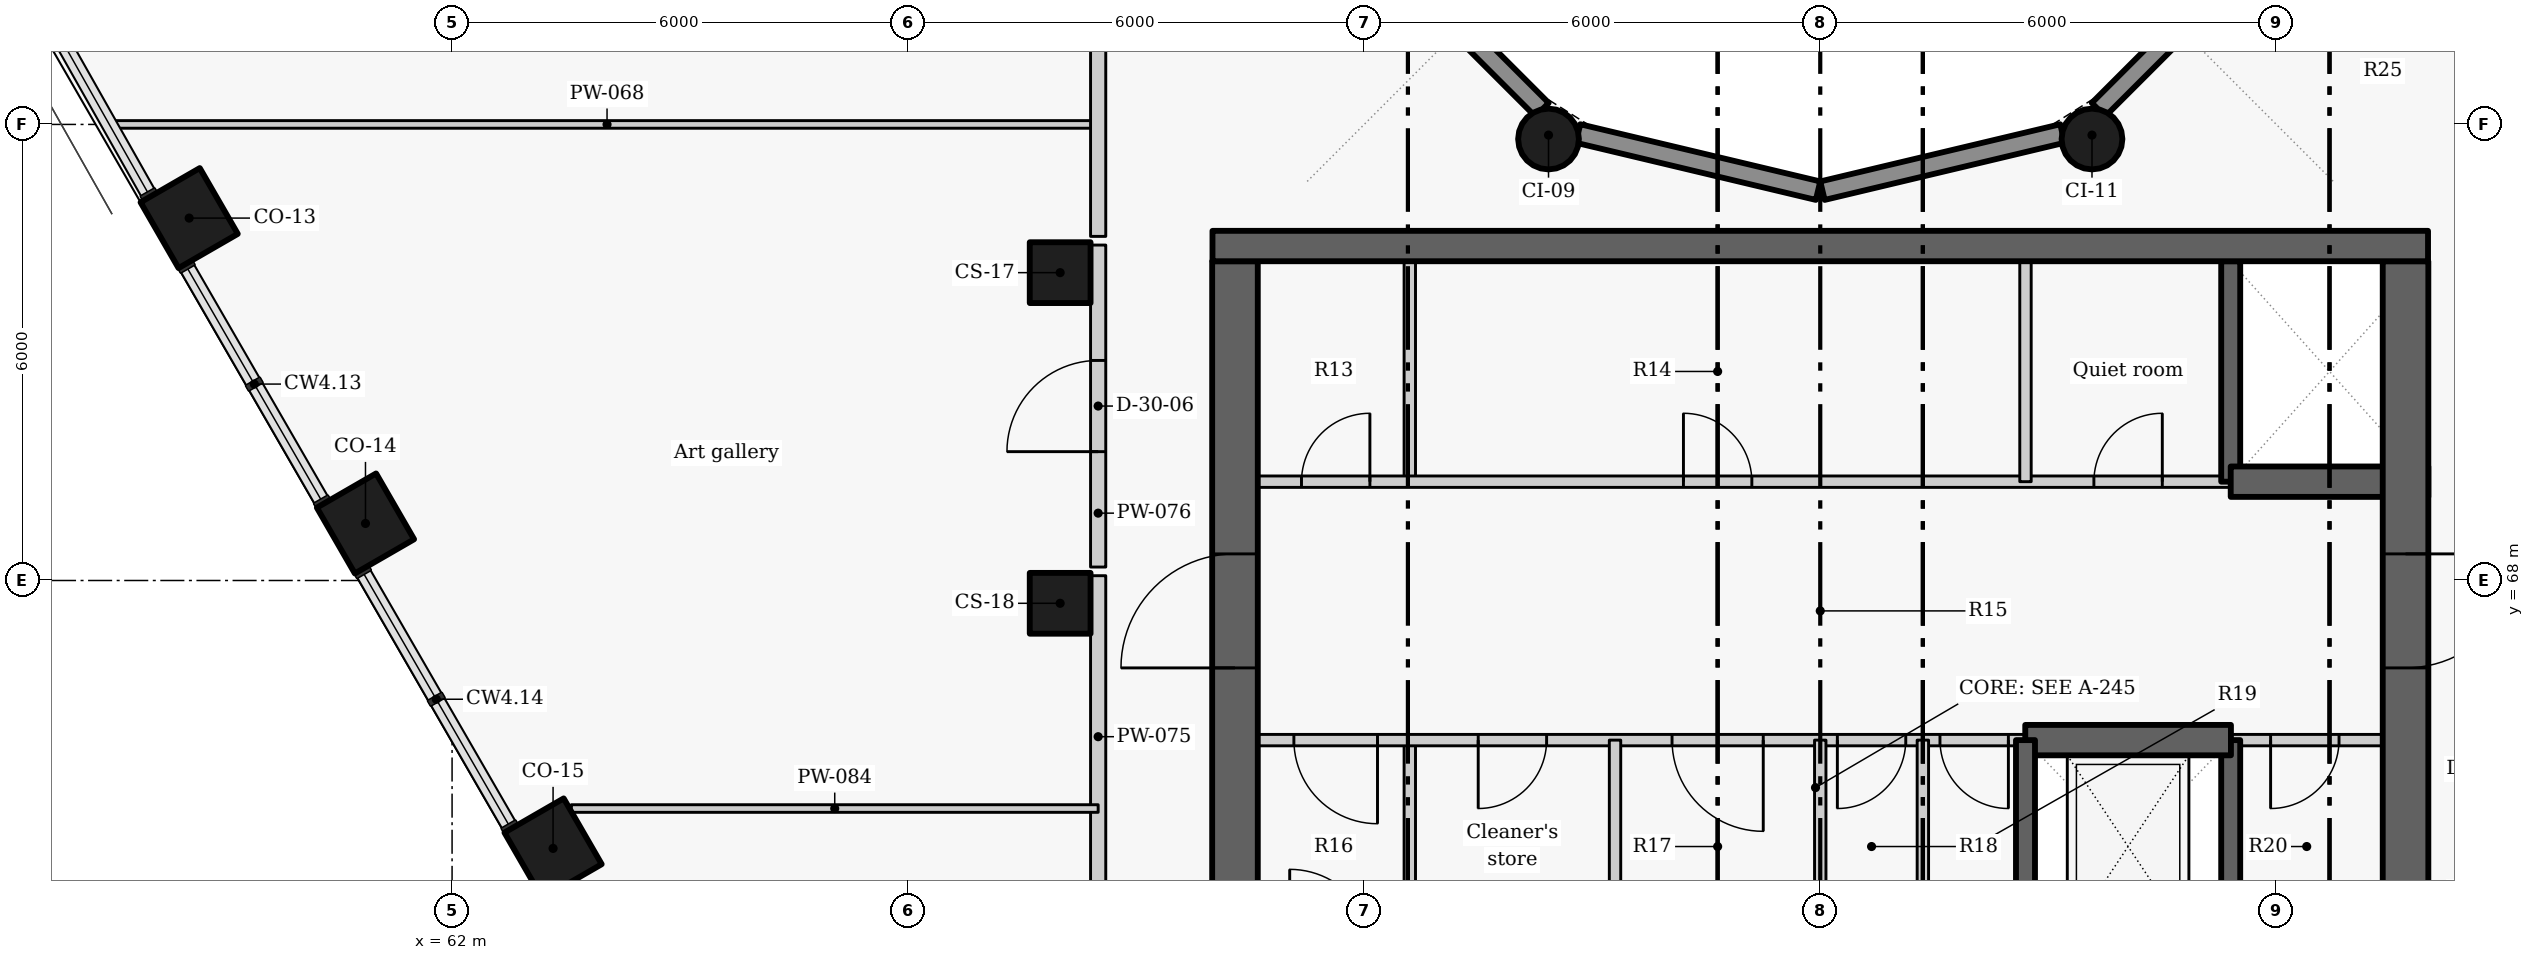
"""IFC4 building model, lengths in metres.
Left out: names, types, materials, properties, quantities, classifications, styles, units other than length and angle.
Written with IfcOpenShell. Run it as: python <this file> out.ifc"""

import sys

from ifc_helpers import new_model, si_unit, direction, frame, frame_2d, origin, origin_2d, place, context, subcontext, project, spatial, rectangle, circle, extrude, element, fill, save


model = new_model("IFC4")
c1 = context("Model", 3, precision=1e-05, world=origin(), true_north=direction((0.0, 1.0)))
c2 = subcontext(c1, "Body", "Model", "MODEL_VIEW")
j1 = project(units=[si_unit("LENGTHUNIT", "METRE"), si_unit("PLANEANGLEUNIT", "RADIAN")], contexts=[c1])
p1 = place(None, origin())
s1 = spatial("IfcSite", under=j1, at=p1, CompositionType="ELEMENT")
p2 = place(p1, origin())
s2 = spatial("IfcBuilding", under=s1, at=p2, CompositionType="ELEMENT")
p3 = place(p2, frame((0.0, 0.0, 272.4)))
s3 = spatial("IfcBuildingStorey", under=s2, at=p3, CompositionType="ELEMENT", Elevation=272.4)
for number, where, z_axis, x_axis in (
    (1, (58.541, 72.768, 0.0), (0.0, 0.0, 1.0), (0.5, -0.866, 0.0)),
    (2, (60.861, 68.75, 0.0), (0.0, 0.0, 1.0), (0.5, -0.866, 0.0)),
    (3, (63.329, 64.475, 0.0), (0.0, 0.0, 1.0), (0.5, -0.866, 0.0)),
):
    element("IfcColumn", number, at=place(p3, frame(where, z_axis=z_axis, x_axis=x_axis)), inside=s3, PredefinedType="COLUMN", context=c2, shape_type="SweptSolid", body=[
        extrude(rectangle(XDim=1.0, YDim=0.9, at=origin_2d()), origin(), (0.0, 0.0, 1.0), 3.6),
    ])
for number, where, z_axis, x_axis in (
    (4, (70.0, 72.05, 0.0), (0.0, 0.0, 1.0), (0.0, -1.0, 0.0)),
    (5, (70.0, 67.7, 0.0), (0.0, 0.0, 1.0), (0.0, -1.0, 0.0)),
):
    element("IfcColumn", number, at=place(p3, frame(where, z_axis=z_axis, x_axis=x_axis)), inside=s3, PredefinedType="COLUMN", context=c2, shape_type="SweptSolid", body=[
        extrude(rectangle(XDim=0.8, YDim=0.8, at=origin_2d()), origin(), (0.0, 0.0, 1.0), 3.6),
    ])
for number, where, z_axis, x_axis in (
    (6, (76.425, 73.808, 0.0), (0.0, 0.0, 1.0), (0.866, -0.5, 0.0)),
    (7, (83.575, 73.808, 0.0), (0.0, 0.0, 1.0), (0.866, 0.5, 0.0)),
):
    element("IfcColumn", number, at=place(p3, frame(where, z_axis=z_axis, x_axis=x_axis)), inside=s3, PredefinedType="COLUMN", context=c2, shape_type="SweptSolid", body=[
        extrude(circle(Radius=0.4, at=origin_2d()), origin(), (0.0, 0.0, 1.0), 3.6),
    ])
p4 = place(p3, frame((85.806, 76.339, 0.0), z_axis=(0.0, 0.0, 1.0), x_axis=(-0.707106781187, -0.707106781187, 0.0)))
e8 = element("IfcWall", 8, at=p4, inside=s3, PredefinedType="SOLIDWALL", context=c2, shape_type="SweptSolid", body=[
    extrude(rectangle(XDim=3.033, YDim=0.25, at=frame_2d((1.517, 0.0))), origin(), (0.0, 0.0, 1.0), 2.725),
])
for number, where, z_axis, x_axis in (
    (9, (83.186, 73.881, 0.0), (0.0, 0.0, 1.0), (-0.973, -0.232, 0.0)),
    (10, (79.971, 73.128, 0.0), (0.0, 0.0, 1.0), (-0.973, 0.232, 0.0)),
):
    element("IfcWall", number, at=place(p3, frame(where, z_axis=z_axis, x_axis=x_axis)), inside=s3, PredefinedType="SOLIDWALL", context=c2, shape_type="SweptSolid", body=[
        extrude(rectangle(XDim=3.246, YDim=0.25, at=frame_2d((1.623, 0.0))), origin(), (0.0, 0.0, 1.0), 2.725),
    ])
p5 = place(p3, frame((76.339, 74.194, 0.0), z_axis=(0.0, 0.0, 1.0), x_axis=(-0.707106781187, 0.707106781187, 0.0)))
e11 = element("IfcWall", 11, at=p5, inside=s3, PredefinedType="SOLIDWALL", context=c2, shape_type="SweptSolid", body=[
    extrude(rectangle(XDim=3.033, YDim=0.25, at=frame_2d((1.517, 0.0))), origin(), (0.0, 0.0, 1.0), 2.725),
])
p6 = place(p3, frame((74.6, 63.1, 0.0), z_axis=(0.0, 0.0, 1.0), x_axis=(0.0, 1.0, 0.0)))
e12 = element("IfcWall", 12, at=p6, inside=s3, PredefinedType="PARTITIONING", context=c2, shape_type="SweptSolid", body=[
    extrude(rectangle(XDim=2.8, YDim=0.15, at=frame_2d((1.4, 0.0))), origin(), (0.0, 0.0, 1.0), 3.325),
])
p7 = place(p3, frame((74.6, 69.3, 0.0), z_axis=(0.0, 0.0, 1.0), x_axis=(0.0, 1.0, 0.0)))
e13 = element("IfcWall", 13, at=p7, inside=s3, PredefinedType="PARTITIONING", context=c2, shape_type="SweptSolid", body=[
    extrude(rectangle(XDim=2.9, YDim=0.15, at=frame_2d((1.45, 0.0))), origin(), (0.0, 0.0, 1.0), 3.325),
])
p8 = place(p3, frame((72.0, 69.3, 0.0), z_axis=(0.0, 0.0, 1.0), x_axis=(1.0, 0.0, 0.0)))
e14 = element("IfcWall", 14, at=p8, inside=s3, PredefinedType="PARTITIONING", context=c2, shape_type="SweptSolid", body=[
    extrude(rectangle(XDim=13.4, YDim=0.15, at=frame_2d((6.7, 0.0))), origin(), (0.0, 0.0, 1.0), 3.325),
])
p9 = place(p8, frame((1.175, 0.0, 0.0)))
e15 = element("IfcOpeningElement", 15, at=p9, cuts=e14, PredefinedType="OPENING", context=c2, shape_type="SweptSolid", body=[
    extrude(rectangle(XDim=0.9, YDim=2.1, at=frame_2d((0.45, 1.05))), frame((0.0, 0.085, 0.0), z_axis=(0.0, -1.0, 0.0), x_axis=(1.0, 0.0, 0.0)), (0.0, 0.0, 1.0), 0.17),
])
p10 = place(p8, frame((6.2, 0.0, 0.0)))
e16 = element("IfcOpeningElement", 16, at=p10, cuts=e14, PredefinedType="OPENING", context=c2, shape_type="SweptSolid", body=[
    extrude(rectangle(XDim=0.9, YDim=2.1, at=frame_2d((0.45, 1.05))), frame((0.0, 0.085, 0.0), z_axis=(0.0, -1.0, 0.0), x_axis=(1.0, 0.0, 0.0)), (0.0, 0.0, 1.0), 0.17),
])
p11 = place(p8, frame((11.6, 0.0, 0.0)))
e17 = element("IfcOpeningElement", 17, at=p11, cuts=e14, PredefinedType="OPENING", context=c2, shape_type="SweptSolid", body=[
    extrude(rectangle(XDim=0.9, YDim=2.1, at=frame_2d((0.45, 1.05))), frame((0.0, 0.085, 0.0), z_axis=(0.0, -1.0, 0.0), x_axis=(1.0, 0.0, 0.0)), (0.0, 0.0, 1.0), 0.17),
])
p12 = place(p3, frame((72.3, 63.1, -0.275), z_axis=(0.0, 0.0, 1.0), x_axis=(0.0, 1.0, 0.0)))
e18 = element("IfcWall", 18, at=p12, inside=s3, PredefinedType="SHEAR", context=c2, shape_type="SweptSolid", body=[
    extrude(rectangle(XDim=9.1, YDim=0.6, at=frame_2d((4.55, 0.0))), origin(), (0.0, 0.0, 1.0), 3.6),
])
p13 = place(p12, frame((3.75, 0.0, 0.275)))
e19 = element("IfcOpeningElement", 19, at=p13, cuts=e18, PredefinedType="OPENING", context=c2, shape_type="SweptSolid", body=[
    extrude(rectangle(XDim=1.5, YDim=2.1, at=frame_2d((0.75, 1.05))), frame((0.0, 0.31, 0.0), z_axis=(0.0, -1.0, 0.0), x_axis=(1.0, 0.0, 0.0)), (0.0, 0.0, 1.0), 0.62),
])
p14 = place(p3, frame((85.4, 63.1, -0.275), z_axis=(0.0, 0.0, 1.0), x_axis=(0.0, 1.0, 0.0)))
e20 = element("IfcWall", 20, at=p14, inside=s3, PredefinedType="SHEAR", context=c2, shape_type="SweptSolid", body=[
    extrude(rectangle(XDim=2.8, YDim=0.25, at=frame_2d((1.4, 0.0))), origin(), (0.0, 0.0, 1.0), 3.6),
])
p15 = place(p3, frame((85.4, 69.3, -0.275), z_axis=(0.0, 0.0, 1.0), x_axis=(0.0, 1.0, 0.0)))
e21 = element("IfcWall", 21, at=p15, inside=s3, PredefinedType="SHEAR", context=c2, shape_type="SweptSolid", body=[
    extrude(rectangle(XDim=2.9, YDim=0.25, at=frame_2d((1.45, 0.0))), origin(), (0.0, 0.0, 1.0), 3.6),
])
p16 = place(p3, frame((85.4, 69.3, -0.275), z_axis=(0.0, 0.0, 1.0), x_axis=(1.0, 0.0, 0.0)))
e22 = element("IfcWall", 22, at=p16, inside=s3, PredefinedType="SHEAR", context=c2, shape_type="SweptSolid", body=[
    extrude(rectangle(XDim=2.6, YDim=0.4, at=frame_2d((1.3, 0.0))), origin(), (0.0, 0.0, 1.0), 3.6),
])
p17 = place(p3, frame((87.7, 72.2, -0.275), z_axis=(0.0, 0.0, 1.0), x_axis=(0.0, -1.0, 0.0)))
e23 = element("IfcWall", 23, at=p17, inside=s3, PredefinedType="SHEAR", context=c2, shape_type="SweptSolid", body=[
    extrude(rectangle(XDim=14.25, YDim=0.6, at=frame_2d((7.125, 0.0))), origin(), (0.0, 0.0, 1.0), 3.6),
])
p18 = place(p17, frame((3.85, 0.0, 0.275)))
e24 = element("IfcOpeningElement", 24, at=p18, cuts=e23, PredefinedType="OPENING", context=c2, shape_type="SweptSolid", body=[
    extrude(rectangle(XDim=1.5, YDim=2.1, at=frame_2d((0.75, 1.05))), frame((0.0, 0.31, 0.0), z_axis=(0.0, -1.0, 0.0), x_axis=(1.0, 0.0, 0.0)), (0.0, 0.0, 1.0), 0.62),
])
p19 = place(p17, frame((11.125, 0.0, 0.275)))
e25 = element("IfcOpeningElement", 25, at=p19, cuts=e23, PredefinedType="OPENING", context=c2, shape_type="SweptSolid", body=[
    extrude(rectangle(XDim=1.1, YDim=2.1, at=frame_2d((0.55, 1.05))), frame((0.0, 0.31, 0.0), z_axis=(0.0, -1.0, 0.0), x_axis=(1.0, 0.0, 0.0)), (0.0, 0.0, 1.0), 0.62),
])
p20 = place(p3, frame((82.7, 69.3, 0.0), z_axis=(0.0, 0.0, 1.0), x_axis=(0.0, 1.0, 0.0)))
e26 = element("IfcWall", 26, at=p20, inside=s3, PredefinedType="PARTITIONING", context=c2, shape_type="SweptSolid", body=[
    extrude(rectangle(XDim=2.9, YDim=0.15, at=frame_2d((1.45, 0.0))), origin(), (0.0, 0.0, 1.0), 3.325),
])
p21 = place(p3, frame((82.703, 65.9, 0.0), z_axis=(0.0, 0.0, 1.0), x_axis=(-1.0, 0.0, 0.0)))
e27 = element("IfcWall", 27, at=p21, inside=s3, PredefinedType="PARTITIONING", context=c2, shape_type="SweptSolid", body=[
    extrude(rectangle(XDim=10.703, YDim=0.15, at=frame_2d((5.352, 0.0))), origin(), (0.0, 0.0, 1.0), 3.325),
])
p22 = place(p21, frame((8.528, 0.0, 0.0)))
e28 = element("IfcOpeningElement", 28, at=p22, cuts=e27, PredefinedType="OPENING", context=c2, shape_type="SweptSolid", body=[
    extrude(rectangle(XDim=1.1, YDim=2.1, at=frame_2d((0.55, 1.05))), frame((0.0, 0.085, 0.0), z_axis=(0.0, -1.0, 0.0), x_axis=(1.0, 0.0, 0.0)), (0.0, 0.0, 1.0), 0.17),
])
p23 = place(p21, frame((6.303, 0.0, 0.0)))
e29 = element("IfcOpeningElement", 29, at=p23, cuts=e27, PredefinedType="OPENING", context=c2, shape_type="SweptSolid", body=[
    extrude(rectangle(XDim=0.9, YDim=2.1, at=frame_2d((0.45, 1.05))), frame((0.0, 0.085, 0.0), z_axis=(0.0, -1.0, 0.0), x_axis=(1.0, 0.0, 0.0)), (0.0, 0.0, 1.0), 0.17),
])
p24 = place(p21, frame((3.453, 0.0, 0.0)))
e30 = element("IfcOpeningElement", 30, at=p24, cuts=e27, PredefinedType="OPENING", context=c2, shape_type="SweptSolid", body=[
    extrude(rectangle(XDim=1.2, YDim=2.1, at=frame_2d((0.6, 1.05))), frame((0.0, 0.085, 0.0), z_axis=(0.0, -1.0, 0.0), x_axis=(1.0, 0.0, 0.0)), (0.0, 0.0, 1.0), 0.17),
])
p25 = place(p21, frame((1.578, 0.0, 0.0)))
e31 = element("IfcOpeningElement", 31, at=p25, cuts=e27, PredefinedType="OPENING", context=c2, shape_type="SweptSolid", body=[
    extrude(rectangle(XDim=0.9, YDim=2.1, at=frame_2d((0.45, 1.05))), frame((0.0, 0.085, 0.0), z_axis=(0.0, -1.0, 0.0), x_axis=(1.0, 0.0, 0.0)), (0.0, 0.0, 1.0), 0.17),
])
p26 = place(p21, frame((0.228, 0.0, 0.0)))
e32 = element("IfcOpeningElement", 32, at=p26, cuts=e27, PredefinedType="OPENING", context=c2, shape_type="SweptSolid", body=[
    extrude(rectangle(XDim=0.9, YDim=2.1, at=frame_2d((0.45, 1.05))), frame((0.0, 0.085, 0.0), z_axis=(0.0, -1.0, 0.0), x_axis=(1.0, 0.0, 0.0)), (0.0, 0.0, 1.0), 0.17),
])
p27 = place(p3, frame((88.0, 65.9, 0.0), z_axis=(0.0, 0.0, 1.0), x_axis=(-1.0, 0.0, 0.0)))
e33 = element("IfcWall", 33, at=p27, inside=s3, PredefinedType="PARTITIONING", context=c2, shape_type="SweptSolid", body=[
    extrude(rectangle(XDim=2.603, YDim=0.15, at=frame_2d((1.302, 0.0))), origin(), (0.0, 0.0, 1.0), 3.325),
])
p28 = place(p27, frame((1.175, 0.0, 0.0)))
e34 = element("IfcOpeningElement", 34, at=p28, cuts=e33, PredefinedType="OPENING", context=c2, shape_type="SweptSolid", body=[
    extrude(rectangle(XDim=0.9, YDim=2.1, at=frame_2d((0.45, 1.05))), frame((0.0, 0.085, 0.0), z_axis=(0.0, -1.0, 0.0), x_axis=(1.0, 0.0, 0.0)), (0.0, 0.0, 1.0), 0.17),
])
p29 = place(p3, frame((82.697, 65.9, -0.275), z_axis=(0.0, 0.0, 1.0), x_axis=(1.0, 0.0, 0.0)))
e35 = element("IfcWall", 35, at=p29, inside=s3, PredefinedType="SHEAR", context=c2, shape_type="SweptSolid", body=[
    extrude(rectangle(XDim=2.706, YDim=0.4, at=frame_2d((1.353, 0.0))), origin(), (0.0, 0.0, 1.0), 3.6),
])
for number, where, z_axis, x_axis in (
    (36, (77.3, 63.1, 0.0), (0.0, 0.0, 1.0), (0.0, 1.0, 0.0)),
    (37, (80.0, 63.1, 0.0), (0.0, 0.0, 1.0), (0.0, 1.0, 0.0)),
    (38, (81.35, 63.1, 0.0), (0.0, 0.0, 1.0), (0.0, 1.0, 0.0)),
):
    element("IfcWall", number, at=place(p3, frame(where, z_axis=z_axis, x_axis=x_axis)), inside=s3, PredefinedType="PARTITIONING", context=c2, shape_type="SweptSolid", body=[
        extrude(rectangle(XDim=2.8, YDim=0.15, at=frame_2d((1.4, 0.0))), origin(), (0.0, 0.0, 1.0), 3.325),
    ])
p30 = place(p3, frame((82.7, 63.1, -0.275), z_axis=(0.0, 0.0, 1.0), x_axis=(0.0, 1.0, 0.0)))
e39 = element("IfcWall", 39, at=p30, inside=s3, PredefinedType="SHEAR", context=c2, shape_type="SweptSolid", body=[
    extrude(rectangle(XDim=2.8, YDim=0.25, at=frame_2d((1.4, 0.0))), origin(), (0.0, 0.0, 1.0), 3.6),
])
p31 = place(p3, frame((57.578, 74.0, 0.0), z_axis=(0.0, 0.0, 1.0), x_axis=(1.0, 0.0, 0.0)))
e40 = element("IfcWall", 40, at=p31, inside=s3, PredefinedType="PARTITIONING", context=c2, shape_type="SweptSolid", body=[
    extrude(rectangle(XDim=12.922, YDim=0.1, at=frame_2d((6.461, 0.0))), origin(), (0.0, 0.0, 1.0), 3.325),
])
p32 = place(p3, frame((70.5, 63.827, 0.0), z_axis=(0.0, 0.0, 1.0), x_axis=(0.0, 1.0, 0.0)))
e41 = element("IfcWall", 41, at=p32, inside=s3, PredefinedType="PARTITIONING", context=c2, shape_type="SweptSolid", body=[
    extrude(rectangle(XDim=4.236, YDim=0.2, at=frame_2d((2.118, 0.0))), origin(), (0.0, 0.0, 1.0), 3.325),
])
p33 = place(p3, frame((70.5, 68.177, 0.0), z_axis=(0.0, 0.0, 1.0), x_axis=(0.0, 1.0, 0.0)))
e42 = element("IfcWall", 42, at=p33, inside=s3, PredefinedType="PARTITIONING", context=c2, shape_type="SweptSolid", body=[
    extrude(rectangle(XDim=4.236, YDim=0.2, at=frame_2d((2.118, 0.0))), origin(), (0.0, 0.0, 1.0), 3.325),
])
p34 = place(p33, frame((1.518, 0.0, 0.0)))
e43 = element("IfcOpeningElement", 43, at=p34, cuts=e42, PredefinedType="OPENING", context=c2, shape_type="SweptSolid", body=[
    extrude(rectangle(XDim=1.2, YDim=2.1, at=frame_2d((0.6, 1.05))), frame((0.0, 0.11, 0.0), z_axis=(0.0, -1.0, 0.0), x_axis=(1.0, 0.0, 0.0)), (0.0, 0.0, 1.0), 0.22),
])
p35 = place(p3, frame((70.5, 72.527, 0.0), z_axis=(0.0, 0.0, 1.0), x_axis=(0.0, 1.0, 0.0)))
e44 = element("IfcWall", 44, at=p35, inside=s3, PredefinedType="PARTITIONING", context=c2, shape_type="SweptSolid", body=[
    extrude(rectangle(XDim=5.186, YDim=0.2, at=frame_2d((2.593, 0.0))), origin(), (0.0, 0.0, 1.0), 3.325),
])
p36 = place(p3, frame((63.569, 65.0, 0.0), z_axis=(0.0, 0.0, 1.0), x_axis=(1.0, 0.0, 0.0)))
e45 = element("IfcWall", 45, at=p36, inside=s3, PredefinedType="PARTITIONING", context=c2, shape_type="SweptSolid", body=[
    extrude(rectangle(XDim=6.931, YDim=0.1, at=frame_2d((3.466, 0.0))), origin(), (0.0, 0.0, 1.0), 2.805),
])
p37 = place(p3, frame((72.004, 72.4, -0.275), z_axis=(0.0, 0.0, 1.0), x_axis=(1.0, 0.0, 0.0)))
e46 = element("IfcWall", 46, at=p37, inside=s3, PredefinedType="SHEAR", context=c2, shape_type="SweptSolid", body=[
    extrude(rectangle(XDim=15.992, YDim=0.4, at=frame_2d((7.996, 0.0))), origin(), (0.0, 0.0, 1.0), 3.6),
])
p38 = place(p9, origin())
e47 = element("IfcDoor", 47, at=p38, inside=s3, OperationType="SINGLE_SWING_RIGHT", PredefinedType="DOOR", context=c2, shape_type="SweptSolid", body=[
    extrude(rectangle(XDim=0.9, YDim=2.1, at=frame_2d((0.45, 1.05))), frame((0.0, 0.025, 0.0), z_axis=(0.0, -1.0, 0.0), x_axis=(1.0, 0.0, 0.0)), (0.0, 0.0, 1.0), 0.05),
])
fill(e15, e47)
p39 = place(p10, origin())
e48 = element("IfcDoor", 48, at=p39, inside=s3, OperationType="SINGLE_SWING_LEFT", PredefinedType="DOOR", context=c2, shape_type="SweptSolid", body=[
    extrude(rectangle(XDim=0.9, YDim=2.1, at=frame_2d((0.45, 1.05))), frame((0.0, 0.025, 0.0), z_axis=(0.0, -1.0, 0.0), x_axis=(1.0, 0.0, 0.0)), (0.0, 0.0, 1.0), 0.05),
])
fill(e16, e48)
p40 = place(p11, origin())
e49 = element("IfcDoor", 49, at=p40, inside=s3, OperationType="SINGLE_SWING_RIGHT", PredefinedType="DOOR", context=c2, shape_type="SweptSolid", body=[
    extrude(rectangle(XDim=0.9, YDim=2.1, at=frame_2d((0.45, 1.05))), frame((0.0, 0.025, 0.0), z_axis=(0.0, -1.0, 0.0), x_axis=(1.0, 0.0, 0.0)), (0.0, 0.0, 1.0), 0.05),
])
fill(e17, e49)
p41 = place(p22, origin())
e50 = element("IfcDoor", 50, at=p41, inside=s3, OperationType="SINGLE_SWING_LEFT", PredefinedType="DOOR", context=c2, shape_type="SweptSolid", body=[
    extrude(rectangle(XDim=1.1, YDim=2.1, at=frame_2d((0.55, 1.05))), frame((0.0, 0.025, 0.0), z_axis=(0.0, -1.0, 0.0), x_axis=(1.0, 0.0, 0.0)), (0.0, 0.0, 1.0), 0.05),
])
fill(e28, e50)
p42 = place(p23, origin())
e51 = element("IfcDoor", 51, at=p42, inside=s3, OperationType="SINGLE_SWING_RIGHT", PredefinedType="DOOR", context=c2, shape_type="SweptSolid", body=[
    extrude(rectangle(XDim=0.9, YDim=2.1, at=frame_2d((0.45, 1.05))), frame((0.0, 0.025, 0.0), z_axis=(0.0, -1.0, 0.0), x_axis=(1.0, 0.0, 0.0)), (0.0, 0.0, 1.0), 0.05),
])
fill(e29, e51)
p43 = place(p24, origin())
e52 = element("IfcDoor", 52, at=p43, inside=s3, OperationType="DOUBLE_DOOR_SINGLE_SWING", PredefinedType="DOOR", context=c2, shape_type="SweptSolid", body=[
    extrude(rectangle(XDim=1.2, YDim=2.1, at=frame_2d((0.6, 1.05))), frame((0.0, 0.025, 0.0), z_axis=(0.0, -1.0, 0.0), x_axis=(1.0, 0.0, 0.0)), (0.0, 0.0, 1.0), 0.05),
])
fill(e30, e52)
p44 = place(p25, origin())
e53 = element("IfcDoor", 53, at=p44, inside=s3, OperationType="SINGLE_SWING_RIGHT", PredefinedType="DOOR", context=c2, shape_type="SweptSolid", body=[
    extrude(rectangle(XDim=0.9, YDim=2.1, at=frame_2d((0.45, 1.05))), frame((0.0, 0.025, 0.0), z_axis=(0.0, -1.0, 0.0), x_axis=(1.0, 0.0, 0.0)), (0.0, 0.0, 1.0), 0.05),
])
fill(e31, e53)
p45 = place(p26, origin())
e54 = element("IfcDoor", 54, at=p45, inside=s3, OperationType="SINGLE_SWING_LEFT", PredefinedType="DOOR", context=c2, shape_type="SweptSolid", body=[
    extrude(rectangle(XDim=0.9, YDim=2.1, at=frame_2d((0.45, 1.05))), frame((0.0, 0.025, 0.0), z_axis=(0.0, -1.0, 0.0), x_axis=(1.0, 0.0, 0.0)), (0.0, 0.0, 1.0), 0.05),
])
fill(e32, e54)
p46 = place(p28, origin())
e55 = element("IfcDoor", 55, at=p46, inside=s3, OperationType="SINGLE_SWING_RIGHT", PredefinedType="DOOR", context=c2, shape_type="SweptSolid", body=[
    extrude(rectangle(XDim=0.9, YDim=2.1, at=frame_2d((0.45, 1.05))), frame((0.0, 0.025, 0.0), z_axis=(0.0, -1.0, 0.0), x_axis=(1.0, 0.0, 0.0)), (0.0, 0.0, 1.0), 0.05),
])
fill(e34, e55)
p47 = place(p34, origin())
e56 = element("IfcDoor", 56, at=p47, inside=s3, OperationType="SINGLE_SWING_LEFT", PredefinedType="DOOR", context=c2, shape_type="SweptSolid", body=[
    extrude(rectangle(XDim=1.2, YDim=2.1, at=frame_2d((0.6, 1.05))), frame((0.0, 0.025, 0.0), z_axis=(0.0, -1.0, 0.0), x_axis=(1.0, 0.0, 0.0)), (0.0, 0.0, 1.0), 0.05),
])
fill(e43, e56)
p48 = place(p18, origin())
e57 = element("IfcDoor", 57, at=p48, inside=s3, OperationType="DOUBLE_DOOR_SINGLE_SWING", PredefinedType="DOOR", context=c2, shape_type="SweptSolid", body=[
    extrude(rectangle(XDim=1.5, YDim=2.1, at=frame_2d((0.75, 1.05))), frame((0.0, 0.025, 0.0), z_axis=(0.0, -1.0, 0.0), x_axis=(1.0, 0.0, 0.0)), (0.0, 0.0, 1.0), 0.05),
])
fill(e24, e57)
p49 = place(p13, origin())
e58 = element("IfcDoor", 58, at=p49, inside=s3, OperationType="DOUBLE_DOOR_SINGLE_SWING", PredefinedType="DOOR", context=c2, shape_type="SweptSolid", body=[
    extrude(rectangle(XDim=1.5, YDim=2.1, at=frame_2d((0.75, 1.05))), frame((0.0, 0.025, 0.0), z_axis=(0.0, -1.0, 0.0), x_axis=(1.0, 0.0, 0.0)), (0.0, 0.0, 1.0), 0.05),
])
fill(e19, e58)
save(model, sys.argv[1])
